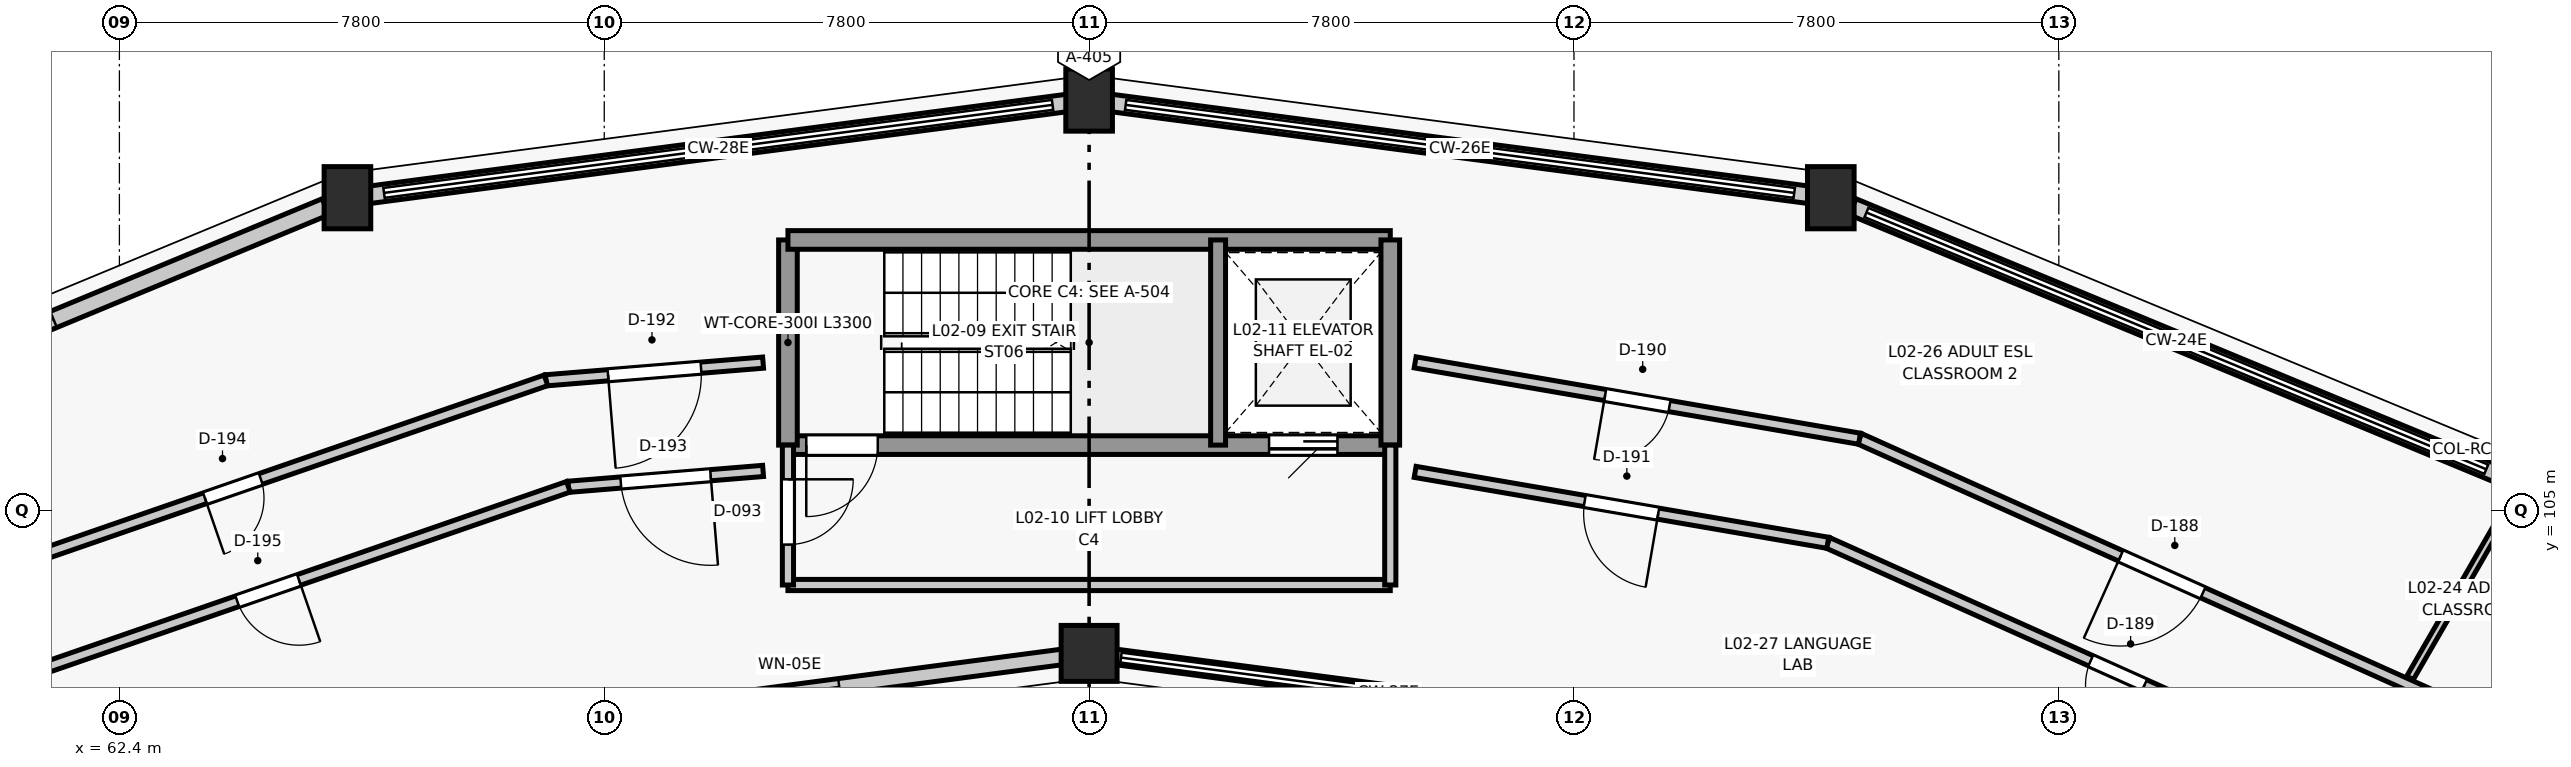
"""IFC4 building model, lengths in metres.
Left out: names, types, materials, properties, quantities, classifications, styles, units other than length and angle.
Written with IfcOpenShell. Run it as: python <this file> out.ifc"""

import sys

from ifc_helpers import new_model, si_unit, direction, frame, frame_2d, origin, origin_2d, place, context, subcontext, project, spatial, rectangle, circle, extrude, element, fill, save


model = new_model("IFC4")
c1 = context("Model", 3, precision=1e-05, world=origin(), true_north=direction((0.0, 1.0)))
c2 = subcontext(c1, "Body", "Model", "MODEL_VIEW")
j1 = project(units=[si_unit("LENGTHUNIT", "METRE"), si_unit("PLANEANGLEUNIT", "RADIAN")], contexts=[c1])
p1 = place(None, origin())
s1 = spatial("IfcSite", under=j1, at=p1, CompositionType="ELEMENT")
p2 = place(p1, origin())
s2 = spatial("IfcBuilding", under=s1, at=p2, CompositionType="ELEMENT")
p3 = place(p2, frame((0.0, 0.0, 8.7)))
s3 = spatial("IfcBuildingStorey", under=s2, at=p3, CompositionType="ELEMENT", Elevation=8.7)
p4 = place(p3, frame((78.0, 102.7, 0.0), z_axis=(0.0, 0.0, 1.0), x_axis=(1.0, 0.0, 0.0)))
e1 = element("IfcColumn", 1, at=p4, inside=s3, PredefinedType="COLUMN", context=c2, shape_type="SweptSolid", body=[
    extrude(circle(Radius=0.45, at=origin_2d()), origin(), (0.0, 0.0, 1.0), 3.9),
])
for number, where, z_axis, x_axis in (
    (2, (89.932, 110.029, 0.0), (0.0, 0.0, 1.0), (1.0, 0.0, 0.0)),
    (3, (78.0, 111.6, 0.0), (0.0, 0.0, 1.0), (1.0, 0.0, 0.0)),
    (4, (66.068, 110.029, 0.0), (0.0, 0.0, 1.0), (1.0, 0.0, 0.0)),
):
    element("IfcColumn", number, at=place(p3, frame(where, z_axis=z_axis, x_axis=x_axis)), inside=s3, PredefinedType="COLUMN", context=c2, shape_type="SweptSolid", body=[
        extrude(rectangle(XDim=0.75, YDim=1.0, at=origin_2d()), origin(), (0.0, 0.0, 1.0), 3.9),
    ])
p5 = place(p3, frame((90.283, 109.883, 0.0), z_axis=(0.0, 0.0, 1.0), x_axis=(0.923883530636, -0.382673779896, 0.0)))
e5 = element("IfcWall", 5, at=p5, inside=s3, PredefinedType="STANDARD", context=c2, shape_type="SweptSolid", body=[
    extrude(rectangle(XDim=11.272, YDim=0.28, at=frame_2d((5.636, 0.0))), origin(), (0.0, 0.0, 1.0), 0.82),
])
p6 = place(p3, frame((78.35, 111.554, 0.0), z_axis=(0.0, 0.0, 1.0), x_axis=(0.991443215359, -0.130538694334, 0.0)))
e6 = element("IfcWall", 6, at=p6, inside=s3, PredefinedType="STANDARD", context=c2, shape_type="SweptSolid", body=[
    extrude(rectangle(XDim=11.328, YDim=0.28, at=frame_2d((5.664, 0.0))), origin(), (0.0, 0.0, 1.0), 0.82),
])
p7 = place(p3, frame((87.353, 101.469, 0.0), z_axis=(0.0, 0.0, 1.0), x_axis=(-0.991441766434, 0.130549698469, 0.0)))
e7 = element("IfcWall", 7, at=p7, inside=s3, PredefinedType="STANDARD", context=c2, shape_type="SweptSolid", body=[
    extrude(rectangle(XDim=9.156, YDim=0.25, at=frame_2d((4.578, 0.0))), origin(), (0.0, 0.0, 1.0), 0.82),
])
p8 = place(p3, frame((66.419, 110.075, 0.0), z_axis=(0.0, 0.0, 1.0), x_axis=(0.991443215359, 0.130538694334, 0.0)))
e8 = element("IfcWall", 8, at=p8, inside=s3, PredefinedType="STANDARD", context=c2, shape_type="SweptSolid", body=[
    extrude(rectangle(XDim=11.328, YDim=0.28, at=frame_2d((5.664, 0.0))), origin(), (0.0, 0.0, 1.0), 0.82),
])
p9 = place(p3, frame((77.725, 102.664, 0.0), z_axis=(0.0, 0.0, 1.0), x_axis=(-0.991441766434, -0.130549698469, 0.0)))
e9 = element("IfcWall", 9, at=p9, inside=s3, PredefinedType="STANDARD", context=c2, shape_type="SweptSolid", body=[
    extrude(rectangle(XDim=9.156, YDim=0.25, at=frame_2d((4.578, 0.0))), origin(), (0.0, 0.0, 1.0), 2.79),
])
p10 = place(p9, frame((3.778, 0.0, 0.85)))
e10 = element("IfcOpeningElement", 10, at=p10, cuts=e9, PredefinedType="OPENING", context=c2, shape_type="SweptSolid", body=[
    extrude(rectangle(XDim=1.6, YDim=1.4, at=frame_2d((0.8, 0.7))), frame((0.0, 0.135, 0.0), z_axis=(0.0, -1.0, 0.0), x_axis=(1.0, 0.0, 0.0)), (0.0, 0.0, 1.0), 0.27),
])
p11 = place(p3, frame((55.302, 105.57, 0.0), z_axis=(0.0, 0.0, 1.0), x_axis=(0.923883530636, 0.382673779896, 0.0)))
e11 = element("IfcWall", 11, at=p11, inside=s3, PredefinedType="STANDARD", context=c2, shape_type="SweptSolid", body=[
    extrude(rectangle(XDim=11.272, YDim=0.28, at=frame_2d((5.636, 0.0))), origin(), (0.0, 0.0, 1.0), 2.706),
])
p12 = place(p11, frame((4.736, 0.0, 0.85)))
e12 = element("IfcOpeningElement", 12, at=p12, cuts=e11, PredefinedType="OPENING", context=c2, shape_type="SweptSolid", body=[
    extrude(rectangle(XDim=1.8, YDim=1.4, at=frame_2d((0.9, 0.7))), frame((0.0, 0.15, 0.0), z_axis=(0.0, -1.0, 0.0), x_axis=(1.0, 0.0, 0.0)), (0.0, 0.0, 1.0), 0.3),
])
p13 = place(p3, frame((82.845, 106.05, 0.0), z_axis=(0.0, 0.0, 1.0), x_axis=(-1.0, 0.0, 0.0)))
e13 = element("IfcWall", 13, at=p13, inside=s3, PredefinedType="SHEAR", context=c2, shape_type="SweptSolid", body=[
    extrude(rectangle(XDim=9.69, YDim=0.3, at=frame_2d((4.845, 0.0))), origin(), (0.0, 0.0, 1.0), 3.9),
])
p14 = place(p13, frame((8.245, 0.0, 0.0)))
e14 = element("IfcOpeningElement", 14, at=p14, cuts=e13, PredefinedType="OPENING", context=c2, shape_type="SweptSolid", body=[
    extrude(rectangle(XDim=1.15, YDim=2.15, at=frame_2d((0.575, 1.075))), frame((0.0, 0.16, 0.0), z_axis=(0.0, -1.0, 0.0), x_axis=(1.0, 0.0, 0.0)), (0.0, 0.0, 1.0), 0.32),
])
p15 = place(p13, frame((0.85, 0.0, 0.0)))
e15 = element("IfcOpeningElement", 15, at=p15, cuts=e13, PredefinedType="OPENING", context=c2, shape_type="SweptSolid", body=[
    extrude(rectangle(XDim=1.1, YDim=2.15, at=frame_2d((0.55, 1.075))), frame((0.0, 0.16, 0.0), z_axis=(0.0, -1.0, 0.0), x_axis=(1.0, 0.0, 0.0)), (0.0, 0.0, 1.0), 0.32),
])
p16 = place(p3, frame((73.155, 106.05, 0.0), z_axis=(0.0, 0.0, 1.0), x_axis=(0.0, 1.0, 0.0)))
e16 = element("IfcWall", 16, at=p16, inside=s3, PredefinedType="SHEAR", context=c2, shape_type="SweptSolid", body=[
    extrude(rectangle(XDim=3.3, YDim=0.3, at=frame_2d((1.65, 0.0))), origin(), (0.0, 0.0, 1.0), 3.9),
])
p17 = place(p3, frame((73.155, 109.35, 0.0), z_axis=(0.0, 0.0, 1.0), x_axis=(1.0, 0.0, 0.0)))
e17 = element("IfcWall", 17, at=p17, inside=s3, PredefinedType="SHEAR", context=c2, shape_type="SweptSolid", body=[
    extrude(rectangle(XDim=9.69, YDim=0.3, at=frame_2d((4.845, 0.0))), origin(), (0.0, 0.0, 1.0), 3.9),
])
p18 = place(p3, frame((82.845, 109.35, 0.0), z_axis=(0.0, 0.0, 1.0), x_axis=(0.0, -1.0, 0.0)))
e18 = element("IfcWall", 18, at=p18, inside=s3, PredefinedType="SHEAR", context=c2, shape_type="SweptSolid", body=[
    extrude(rectangle(XDim=3.3, YDim=0.3, at=frame_2d((1.65, 0.0))), origin(), (0.0, 0.0, 1.0), 3.9),
])
p19 = place(p3, frame((80.075, 106.05, 0.0), z_axis=(0.0, 0.0, 1.0), x_axis=(0.0, 1.0, 0.0)))
e19 = element("IfcWall", 19, at=p19, inside=s3, PredefinedType="SHEAR", context=c2, shape_type="SweptSolid", body=[
    extrude(rectangle(XDim=3.3, YDim=0.24, at=frame_2d((1.65, 0.0))), origin(), (0.0, 0.0, 1.0), 3.9),
])
p20 = place(p3, frame((73.155, 103.8, 0.0), z_axis=(0.0, 0.0, 1.0), x_axis=(1.0, 0.0, 0.0)))
e20 = element("IfcWall", 20, at=p20, inside=s3, PredefinedType="PARTITIONING", context=c2, shape_type="SweptSolid", body=[
    extrude(rectangle(XDim=9.69, YDim=0.18, at=frame_2d((4.845, 0.0))), origin(), (0.0, 0.0, 1.0), 3.495),
])
p21 = place(p3, frame((73.155, 106.05, 0.0), z_axis=(0.0, 0.0, 1.0), x_axis=(0.0, -1.0, 0.0)))
e21 = element("IfcWall", 21, at=p21, inside=s3, PredefinedType="PARTITIONING", context=c2, shape_type="SweptSolid", body=[
    extrude(rectangle(XDim=2.25, YDim=0.18, at=frame_2d((1.125, 0.0))), origin(), (0.0, 0.0, 1.0), 3.495),
])
p22 = place(p21, frame((0.55, 0.0, 0.0)))
e22 = element("IfcOpeningElement", 22, at=p22, cuts=e21, PredefinedType="OPENING", context=c2, shape_type="SweptSolid", body=[
    extrude(rectangle(XDim=1.05, YDim=2.1, at=frame_2d((0.525, 1.05))), frame((0.0, 0.1, 0.0), z_axis=(0.0, -1.0, 0.0), x_axis=(1.0, 0.0, 0.0)), (0.0, 0.0, 1.0), 0.2),
])
p23 = place(p3, frame((82.845, 106.05, 0.0), z_axis=(0.0, 0.0, 1.0), x_axis=(0.0, -1.0, 0.0)))
e23 = element("IfcWall", 23, at=p23, inside=s3, PredefinedType="PARTITIONING", context=c2, shape_type="SweptSolid", body=[
    extrude(rectangle(XDim=2.25, YDim=0.18, at=frame_2d((1.125, 0.0))), origin(), (0.0, 0.0, 1.0), 3.495),
])
p24 = place(p3, frame((100.12, 101.79, 0.0), z_axis=(0.0, 0.0, 1.0), x_axis=(-0.912414084207, 0.409268297015, 0.0)))
e24 = element("IfcWall", 24, at=p24, inside=s3, PredefinedType="PARTITIONING", context=c2, shape_type="SweptSolid", body=[
    extrude(rectangle(XDim=10.66, YDim=0.18, at=frame_2d((5.33, 0.0))), origin(), (0.0, 0.0, 1.0), 3.495),
])
p25 = place(p24, frame((4.605, 0.0, 0.0)))
e25 = element("IfcOpeningElement", 25, at=p25, cuts=e24, PredefinedType="OPENING", context=c2, shape_type="SweptSolid", body=[
    extrude(rectangle(XDim=1.45, YDim=2.2, at=frame_2d((0.725, 1.1))), frame((0.0, 0.1, 0.0), z_axis=(0.0, -1.0, 0.0), x_axis=(1.0, 0.0, 0.0)), (0.0, 0.0, 1.0), 0.2),
])
p26 = place(p3, frame((99.209, 100.296, 0.0), z_axis=(0.0, 0.0, 1.0), x_axis=(-0.912404455482, 0.409289762414, 0.0)))
e26 = element("IfcWall", 26, at=p26, inside=s3, PredefinedType="PARTITIONING", context=c2, shape_type="SweptSolid", body=[
    extrude(rectangle(XDim=10.221, YDim=0.18, at=frame_2d((5.11, 0.0))), origin(), (0.0, 0.0, 1.0), 3.495),
])
p27 = place(p26, frame((4.635, 0.0, 0.0)))
e27 = element("IfcOpeningElement", 27, at=p27, cuts=e26, PredefinedType="OPENING", context=c2, shape_type="SweptSolid", body=[
    extrude(rectangle(XDim=0.95, YDim=2.1, at=frame_2d((0.475, 1.05))), frame((0.0, 0.1, 0.0), z_axis=(0.0, -1.0, 0.0), x_axis=(1.0, 0.0, 0.0)), (0.0, 0.0, 1.0), 0.2),
])
p28 = place(p3, frame((90.394, 106.153, 0.0), z_axis=(0.0, 0.0, 1.0), x_axis=(-0.985557318444, 0.169342174491, 0.0)))
e28 = element("IfcWall", 28, at=p28, inside=s3, PredefinedType="PARTITIONING", context=c2, shape_type="SweptSolid", body=[
    extrude(rectangle(XDim=7.253, YDim=0.18, at=frame_2d((3.626, 0.0))), origin(), (0.0, 0.0, 1.0), 3.495),
])
p29 = place(p28, frame((3.102, 0.0, 0.0)))
e29 = element("IfcOpeningElement", 29, at=p29, cuts=e28, PredefinedType="OPENING", context=c2, shape_type="SweptSolid", body=[
    extrude(rectangle(XDim=1.05, YDim=2.1, at=frame_2d((0.525, 1.05))), frame((0.0, 0.1, 0.0), z_axis=(0.0, -1.0, 0.0), x_axis=(1.0, 0.0, 0.0)), (0.0, 0.0, 1.0), 0.2),
])
p30 = place(p3, frame((89.883, 104.479, 0.0), z_axis=(0.0, 0.0, 1.0), x_axis=(-0.98556269187, 0.169310898629, 0.0)))
e30 = element("IfcWall", 30, at=p30, inside=s3, PredefinedType="PARTITIONING", context=c2, shape_type="SweptSolid", body=[
    extrude(rectangle(XDim=6.735, YDim=0.18, at=frame_2d((3.368, 0.0))), origin(), (0.0, 0.0, 1.0), 3.495),
])
p31 = place(p30, frame((2.768, 0.0, 0.0)))
e31 = element("IfcOpeningElement", 31, at=p31, cuts=e30, PredefinedType="OPENING", context=c2, shape_type="SweptSolid", body=[
    extrude(rectangle(XDim=1.2, YDim=2.15, at=frame_2d((0.6, 1.075))), frame((0.0, 0.1, 0.0), z_axis=(0.0, -1.0, 0.0), x_axis=(1.0, 0.0, 0.0)), (0.0, 0.0, 1.0), 0.2),
])
p32 = place(p3, frame((72.755, 107.377, 0.0), z_axis=(0.0, 0.0, 1.0), x_axis=(-0.99669970506, -0.081176954446, 0.0)))
e32 = element("IfcWall", 32, at=p32, inside=s3, PredefinedType="PARTITIONING", context=c2, shape_type="SweptSolid", body=[
    extrude(rectangle(XDim=3.504, YDim=0.18, at=frame_2d((1.752, 0.0))), origin(), (0.0, 0.0, 1.0), 3.495),
])
p33 = place(p32, frame((1.002, 0.0, 0.0)))
e33 = element("IfcOpeningElement", 33, at=p33, cuts=e32, PredefinedType="OPENING", context=c2, shape_type="SweptSolid", body=[
    extrude(rectangle(XDim=1.5, YDim=2.15, at=frame_2d((0.75, 1.075))), frame((0.0, 0.1, 0.0), z_axis=(0.0, -1.0, 0.0), x_axis=(1.0, 0.0, 0.0)), (0.0, 0.0, 1.0), 0.2),
])
p34 = place(p3, frame((72.755, 105.635, 0.0), z_axis=(0.0, 0.0, 1.0), x_axis=(-0.996693095602, -0.081258065316, 0.0)))
e34 = element("IfcWall", 34, at=p34, inside=s3, PredefinedType="PARTITIONING", context=c2, shape_type="SweptSolid", body=[
    extrude(rectangle(XDim=3.143, YDim=0.18, at=frame_2d((1.571, 0.0))), origin(), (0.0, 0.0, 1.0), 3.495),
])
p35 = place(p34, frame((0.846, 0.0, 0.0)))
e35 = element("IfcOpeningElement", 35, at=p35, cuts=e34, PredefinedType="OPENING", context=c2, shape_type="SweptSolid", body=[
    extrude(rectangle(XDim=1.45, YDim=2.2, at=frame_2d((0.725, 1.1))), frame((0.0, 0.1, 0.0), z_axis=(0.0, -1.0, 0.0), x_axis=(1.0, 0.0, 0.0)), (0.0, 0.0, 1.0), 0.2),
])
p36 = place(p3, frame((69.263, 107.092, 0.0), z_axis=(0.0, 0.0, 1.0), x_axis=(-0.945128117061, -0.326699927059, 0.0)))
e36 = element("IfcWall", 36, at=p36, inside=s3, PredefinedType="PARTITIONING", context=c2, shape_type="SweptSolid", body=[
    extrude(rectangle(XDim=10.66, YDim=0.18, at=frame_2d((5.33, 0.0))), origin(), (0.0, 0.0, 1.0), 3.495),
])
p37 = place(p36, frame((4.855, 0.0, 0.0)))
e37 = element("IfcOpeningElement", 37, at=p37, cuts=e36, PredefinedType="OPENING", context=c2, shape_type="SweptSolid", body=[
    extrude(rectangle(XDim=0.95, YDim=2.1, at=frame_2d((0.475, 1.05))), frame((0.0, 0.1, 0.0), z_axis=(0.0, -1.0, 0.0), x_axis=(1.0, 0.0, 0.0)), (0.0, 0.0, 1.0), 0.2),
])
p38 = place(p3, frame((69.623, 105.38, 0.0), z_axis=(0.0, 0.0, 1.0), x_axis=(-0.945125986937, -0.326706089346, 0.0)))
e38 = element("IfcWall", 38, at=p38, inside=s3, PredefinedType="PARTITIONING", context=c2, shape_type="SweptSolid", body=[
    extrude(rectangle(XDim=10.221, YDim=0.18, at=frame_2d((5.111, 0.0))), origin(), (0.0, 0.0, 1.0), 3.495),
])
p39 = place(p38, frame((4.586, 0.0, 0.0)))
e39 = element("IfcOpeningElement", 39, at=p39, cuts=e38, PredefinedType="OPENING", context=c2, shape_type="SweptSolid", body=[
    extrude(rectangle(XDim=1.05, YDim=2.1, at=frame_2d((0.525, 1.05))), frame((0.0, 0.1, 0.0), z_axis=(0.0, -1.0, 0.0), x_axis=(1.0, 0.0, 0.0)), (0.0, 0.0, 1.0), 0.2),
])
p40 = place(p3, frame((99.25, 102.306, 0.0), z_axis=(0.0, 0.0, 1.0), x_axis=(0.499978833458, 0.866037623948, 0.0)))
e40 = element("IfcWall", 40, at=p40, inside=s3, PredefinedType="PARTITIONING", context=c2, shape_type="SweptSolid", body=[
    extrude(rectangle(XDim=3.05, YDim=0.12, at=frame_2d((1.525, 0.0))), origin(), (0.0, 0.0, 1.0), 2.857),
])
p41 = place(p10, origin())
e41 = element("IfcWindow", 41, at=p41, inside=s3, PartitioningType="SINGLE_PANEL", PredefinedType="WINDOW", context=c2, shape_type="SweptSolid", body=[
    extrude(rectangle(XDim=1.6, YDim=1.4, at=frame_2d((0.8, 0.7))), frame((0.0, 0.03, 0.0), z_axis=(0.0, -1.0, 0.0), x_axis=(1.0, 0.0, 0.0)), (0.0, 0.0, 1.0), 0.06),
])
fill(e10, e41)
p42 = place(p12, origin())
e42 = element("IfcWindow", 42, at=p42, inside=s3, PartitioningType="SINGLE_PANEL", PredefinedType="WINDOW", context=c2, shape_type="SweptSolid", body=[
    extrude(rectangle(XDim=1.8, YDim=1.4, at=frame_2d((0.9, 0.7))), frame((0.0, 0.03, 0.0), z_axis=(0.0, -1.0, 0.0), x_axis=(1.0, 0.0, 0.0)), (0.0, 0.0, 1.0), 0.06),
])
fill(e12, e42)
p43 = place(p14, origin())
e43 = element("IfcDoor", 43, at=p43, inside=s3, OperationType="SINGLE_SWING_RIGHT", PredefinedType="DOOR", context=c2, shape_type="SweptSolid", body=[
    extrude(rectangle(XDim=1.15, YDim=2.15, at=frame_2d((0.575, 1.075))), frame((0.0, 0.025, 0.0), z_axis=(0.0, -1.0, 0.0), x_axis=(1.0, 0.0, 0.0)), (0.0, 0.0, 1.0), 0.05),
])
fill(e14, e43)
p44 = place(p15, origin())
e44 = element("IfcDoor", 44, at=p44, inside=s3, OperationType="SLIDING_TO_LEFT", PredefinedType="DOOR", context=c2, shape_type="SweptSolid", body=[
    extrude(rectangle(XDim=1.1, YDim=2.15, at=frame_2d((0.55, 1.075))), frame((0.0, 0.025, 0.0), z_axis=(0.0, -1.0, 0.0), x_axis=(1.0, 0.0, 0.0)), (0.0, 0.0, 1.0), 0.05),
])
fill(e15, e44)
p45 = place(p22, origin())
e45 = element("IfcDoor", 45, at=p45, inside=s3, OperationType="SINGLE_SWING_LEFT", PredefinedType="DOOR", context=c2, shape_type="SweptSolid", body=[
    extrude(rectangle(XDim=1.05, YDim=2.1, at=frame_2d((0.525, 1.05))), frame((0.0, 0.025, 0.0), z_axis=(0.0, -1.0, 0.0), x_axis=(1.0, 0.0, 0.0)), (0.0, 0.0, 1.0), 0.05),
])
fill(e22, e45)
p46 = place(p25, origin())
e46 = element("IfcDoor", 46, at=p46, inside=s3, OperationType="SINGLE_SWING_RIGHT", PredefinedType="DOOR", context=c2, shape_type="SweptSolid", body=[
    extrude(rectangle(XDim=1.45, YDim=2.2, at=frame_2d((0.725, 1.1))), frame((0.0, 0.025, 0.0), z_axis=(0.0, -1.0, 0.0), x_axis=(1.0, 0.0, 0.0)), (0.0, 0.0, 1.0), 0.05),
])
fill(e25, e46)
p47 = place(p27, origin())
e47 = element("IfcDoor", 47, at=p47, inside=s3, OperationType="SINGLE_SWING_LEFT", PredefinedType="DOOR", context=c2, shape_type="SweptSolid", body=[
    extrude(rectangle(XDim=0.95, YDim=2.1, at=frame_2d((0.475, 1.05))), frame((0.0, 0.025, 0.0), z_axis=(0.0, -1.0, 0.0), x_axis=(1.0, 0.0, 0.0)), (0.0, 0.0, 1.0), 0.05),
])
fill(e27, e47)
p48 = place(p29, origin())
e48 = element("IfcDoor", 48, at=p48, inside=s3, OperationType="SINGLE_SWING_RIGHT", PredefinedType="DOOR", context=c2, shape_type="SweptSolid", body=[
    extrude(rectangle(XDim=1.05, YDim=2.1, at=frame_2d((0.525, 1.05))), frame((0.0, 0.025, 0.0), z_axis=(0.0, -1.0, 0.0), x_axis=(1.0, 0.0, 0.0)), (0.0, 0.0, 1.0), 0.05),
])
fill(e29, e48)
p49 = place(p31, origin())
e49 = element("IfcDoor", 49, at=p49, inside=s3, OperationType="SINGLE_SWING_LEFT", PredefinedType="DOOR", context=c2, shape_type="SweptSolid", body=[
    extrude(rectangle(XDim=1.2, YDim=2.15, at=frame_2d((0.6, 1.075))), frame((0.0, 0.025, 0.0), z_axis=(0.0, -1.0, 0.0), x_axis=(1.0, 0.0, 0.0)), (0.0, 0.0, 1.0), 0.05),
])
fill(e31, e49)
p50 = place(p33, origin())
e50 = element("IfcDoor", 50, at=p50, inside=s3, OperationType="SINGLE_SWING_RIGHT", PredefinedType="DOOR", context=c2, shape_type="SweptSolid", body=[
    extrude(rectangle(XDim=1.5, YDim=2.15, at=frame_2d((0.75, 1.075))), frame((0.0, 0.025, 0.0), z_axis=(0.0, -1.0, 0.0), x_axis=(1.0, 0.0, 0.0)), (0.0, 0.0, 1.0), 0.05),
])
fill(e33, e50)
p51 = place(p35, origin())
e51 = element("IfcDoor", 51, at=p51, inside=s3, OperationType="SINGLE_SWING_LEFT", PredefinedType="DOOR", context=c2, shape_type="SweptSolid", body=[
    extrude(rectangle(XDim=1.45, YDim=2.2, at=frame_2d((0.725, 1.1))), frame((0.0, 0.025, 0.0), z_axis=(0.0, -1.0, 0.0), x_axis=(1.0, 0.0, 0.0)), (0.0, 0.0, 1.0), 0.05),
])
fill(e35, e51)
p52 = place(p37, origin())
e52 = element("IfcDoor", 52, at=p52, inside=s3, OperationType="SINGLE_SWING_RIGHT", PredefinedType="DOOR", context=c2, shape_type="SweptSolid", body=[
    extrude(rectangle(XDim=0.95, YDim=2.1, at=frame_2d((0.475, 1.05))), frame((0.0, 0.025, 0.0), z_axis=(0.0, -1.0, 0.0), x_axis=(1.0, 0.0, 0.0)), (0.0, 0.0, 1.0), 0.05),
])
fill(e37, e52)
p53 = place(p39, origin())
e53 = element("IfcDoor", 53, at=p53, inside=s3, OperationType="SINGLE_SWING_LEFT", PredefinedType="DOOR", context=c2, shape_type="SweptSolid", body=[
    extrude(rectangle(XDim=1.05, YDim=2.1, at=frame_2d((0.525, 1.05))), frame((0.0, 0.025, 0.0), z_axis=(0.0, -1.0, 0.0), x_axis=(1.0, 0.0, 0.0)), (0.0, 0.0, 1.0), 0.05),
])
fill(e39, e53)
save(model, sys.argv[1])
